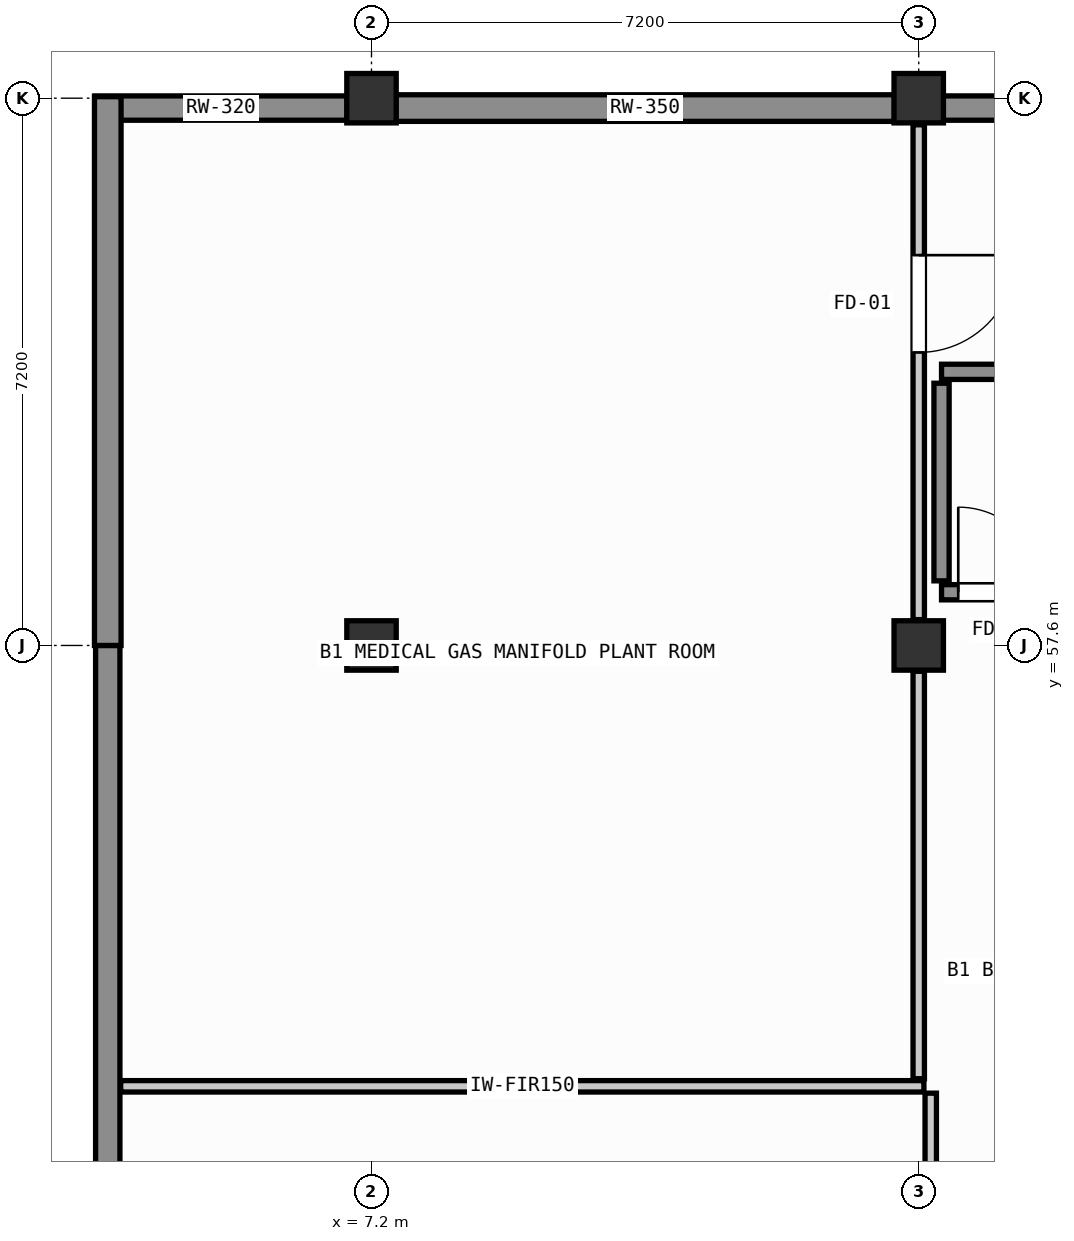
"""IFC4 building model, lengths in metres.
Left out: names, types, materials, properties, quantities, classifications, styles, units other than length and angle.
Written with IfcOpenShell. Run it as: python <this file> out.ifc"""

import sys

from ifc_helpers import new_model, si_unit, direction, frame, frame_2d, origin, origin_2d, place, context, subcontext, project, spatial, rectangle, extrude, element, fill, save


model = new_model("IFC4")
c1 = context("Model", 3, precision=1e-05, world=origin(), true_north=direction((0.0, 1.0)))
c2 = subcontext(c1, "Body", "Model", "MODEL_VIEW")
j1 = project(units=[si_unit("LENGTHUNIT", "METRE"), si_unit("PLANEANGLEUNIT", "RADIAN")], contexts=[c1])
p1 = place(None, origin())
s1 = spatial("IfcSite", under=j1, at=p1, CompositionType="ELEMENT")
p2 = place(p1, origin())
s2 = spatial("IfcBuilding", under=s1, at=p2, CompositionType="ELEMENT")
p3 = place(p2, frame((0.0, 0.0, -4.5)))
s3 = spatial("IfcBuildingStorey", under=s2, at=p3, CompositionType="ELEMENT", Elevation=-4.5)
for number, where, z_axis, x_axis in (
    (1, (7.2, 57.6, -0.5), (0.0, 0.0, 1.0), (1.0, 0.0, 0.0)),
    (2, (7.2, 64.8, -0.5), (0.0, 0.0, 1.0), (1.0, 0.0, 0.0)),
    (3, (14.4, 57.6, -0.5), (0.0, 0.0, 1.0), (1.0, 0.0, 0.0)),
    (4, (14.4, 64.8, -0.5), (0.0, 0.0, 1.0), (1.0, 0.0, 0.0)),
):
    element("IfcColumn", number, at=place(p3, frame(where, z_axis=z_axis, x_axis=x_axis)), inside=s3, PredefinedType="COLUMN", context=c2, shape_type="SweptSolid", body=[
        extrude(rectangle(XDim=0.65, YDim=0.65, at=origin_2d()), origin(), (0.0, 0.0, 1.0), 4.75),
    ])
p4 = place(p3, frame((3.56, 64.67, 0.0), z_axis=(0.0, 0.0, 1.0), x_axis=(1.0, 0.0, 0.0)))
e5 = element("IfcWall", 5, at=p4, inside=s3, PredefinedType="SOLIDWALL", context=c2, shape_type="SweptSolid", body=[
    extrude(rectangle(XDim=3.32, YDim=0.32, at=frame_2d((1.66, 0.0))), origin(), (0.0, 0.0, 1.0), 4.25),
])
p5 = place(p3, frame((7.52, 64.67, 0.0), z_axis=(0.0, 0.0, 1.0), x_axis=(1.0, 0.0, 0.0)))
e6 = element("IfcWall", 6, at=p5, inside=s3, PredefinedType="SOLIDWALL", context=c2, shape_type="SweptSolid", body=[
    extrude(rectangle(XDim=6.56, YDim=0.35, at=frame_2d((3.28, 0.0))), origin(), (0.0, 0.0, 1.0), 4.25),
])
p6 = place(p3, frame((14.72, 64.67, 0.0), z_axis=(0.0, 0.0, 1.0), x_axis=(1.0, 0.0, 0.0)))
e7 = element("IfcWall", 7, at=p6, inside=s3, PredefinedType="SOLIDWALL", context=c2, shape_type="SweptSolid", body=[
    extrude(rectangle(XDim=6.56, YDim=0.32, at=frame_2d((3.28, 0.0))), origin(), (0.0, 0.0, 1.0), 4.25),
])
p7 = place(p3, frame((3.73, 50.4, 0.0), z_axis=(0.0, 0.0, 1.0), x_axis=(0.0, 1.0, 0.0)))
e8 = element("IfcWall", 8, at=p7, inside=s3, PredefinedType="SOLIDWALL", context=c2, shape_type="SweptSolid", body=[
    extrude(rectangle(XDim=7.2, YDim=0.32, at=frame_2d((3.6, 0.0))), origin(), (0.0, 0.0, 1.0), 4.25),
])
p8 = place(p3, frame((3.73, 57.6, 0.0), z_axis=(0.0, 0.0, 1.0), x_axis=(0.0, 1.0, 0.0)))
e9 = element("IfcWall", 9, at=p8, inside=s3, PredefinedType="SOLIDWALL", context=c2, shape_type="SweptSolid", body=[
    extrude(rectangle(XDim=7.22, YDim=0.35, at=frame_2d((3.61, 0.0))), origin(), (0.0, 0.0, 1.0), 4.25),
])
p9 = place(p3, frame((14.7, 58.3, -0.5), z_axis=(0.0, 0.0, 1.0), x_axis=(1.0, 0.0, 0.0)))
e10 = element("IfcWall", 10, at=p9, inside=s3, PredefinedType="SHEAR", context=c2, shape_type="SweptSolid", body=[
    extrude(rectangle(XDim=6.775, YDim=0.2, at=frame_2d((3.388, 0.0))), origin(), (0.0, 0.0, 1.0), 5.0),
])
p10 = place(p9, frame((0.22, 0.0, 0.5)))
e11 = element("IfcOpeningElement", 11, at=p10, cuts=e10, PredefinedType="OPENING", context=c2, shape_type="SweptSolid", body=[
    extrude(rectangle(XDim=1.12, YDim=2.14, at=frame_2d((0.56, 1.07))), frame((0.0, 0.11, 0.0), z_axis=(0.0, -1.0, 0.0), x_axis=(1.0, 0.0, 0.0)), (0.0, 0.0, 1.0), 0.22),
])
p11 = place(p3, frame((14.7, 61.2, -0.5), z_axis=(0.0, 0.0, 1.0), x_axis=(1.0, 0.0, 0.0)))
e12 = element("IfcWall", 12, at=p11, inside=s3, PredefinedType="SHEAR", context=c2, shape_type="SweptSolid", body=[
    extrude(rectangle(XDim=6.775, YDim=0.2, at=frame_2d((3.388, 0.0))), origin(), (0.0, 0.0, 1.0), 5.0),
])
p12 = place(p3, frame((14.7, 58.45, -0.5), z_axis=(0.0, 0.0, 1.0), x_axis=(0.0, 1.0, 0.0)))
e13 = element("IfcWall", 13, at=p12, inside=s3, PredefinedType="SHEAR", context=c2, shape_type="SweptSolid", body=[
    extrude(rectangle(XDim=2.6, YDim=0.2, at=frame_2d((1.3, 0.0))), origin(), (0.0, 0.0, 1.0), 5.0),
])
p13 = place(p3, frame((3.9, 51.8, 0.0), z_axis=(0.0, 0.0, 1.0), x_axis=(1.0, 0.0, 0.0)))
e14 = element("IfcWall", 14, at=p13, inside=s3, PredefinedType="PARTITIONING", context=c2, shape_type="SweptSolid", body=[
    extrude(rectangle(XDim=10.568, YDim=0.15, at=frame_2d((5.284, 0.0))), origin(), (0.0, 0.0, 1.0), 3.55),
])
p14 = place(p3, frame((14.558, 51.71, 0.0), z_axis=(0.0, 0.0, 1.0), x_axis=(0.0, -1.0, 0.0)))
e15 = element("IfcWall", 15, at=p14, inside=s3, PredefinedType="PARTITIONING", context=c2, shape_type="SweptSolid", body=[
    extrude(rectangle(XDim=0.97, YDim=0.15, at=frame_2d((0.485, 0.0))), origin(), (0.0, 0.0, 1.0), 3.4),
])
p15 = place(p3, frame((14.4, 64.45, 0.0), z_axis=(0.0, 0.0, 1.0), x_axis=(0.0, -1.0, 0.0)))
e16 = element("IfcWall", 16, at=p15, inside=s3, PredefinedType="PARTITIONING", context=c2, shape_type="SweptSolid", body=[
    extrude(rectangle(XDim=6.51, YDim=0.15, at=frame_2d((3.255, 0.0))), origin(), (0.0, 0.0, 1.0), 3.4),
])
p16 = place(p15, frame((1.715, 0.0, 0.0)))
e17 = element("IfcOpeningElement", 17, at=p16, cuts=e16, PredefinedType="OPENING", context=c2, shape_type="SweptSolid", body=[
    extrude(rectangle(XDim=1.28, YDim=2.18, at=frame_2d((0.64, 1.09))), frame((0.0, 0.085, 0.0), z_axis=(0.0, -1.0, 0.0), x_axis=(1.0, 0.0, 0.0)), (0.0, 0.0, 1.0), 0.17),
])
p17 = place(p3, frame((14.4, 57.26, 0.0), z_axis=(0.0, 0.0, 1.0), x_axis=(0.0, -1.0, 0.0)))
e18 = element("IfcWall", 18, at=p17, inside=s3, PredefinedType="PARTITIONING", context=c2, shape_type="SweptSolid", body=[
    extrude(rectangle(XDim=5.36, YDim=0.15, at=frame_2d((2.68, 0.0))), origin(), (0.0, 0.0, 1.0), 3.4),
])
p18 = place(p10, origin())
e19 = element("IfcDoor", 19, at=p18, inside=s3, OperationType="SINGLE_SWING_LEFT", PredefinedType="DOOR", context=c2, shape_type="SweptSolid", body=[
    extrude(rectangle(XDim=1.12, YDim=2.14, at=frame_2d((0.56, 1.07))), frame((0.0, 0.025, 0.0), z_axis=(0.0, -1.0, 0.0), x_axis=(1.0, 0.0, 0.0)), (0.0, 0.0, 1.0), 0.05),
])
fill(e11, e19)
p19 = place(p16, origin())
e20 = element("IfcDoor", 20, at=p19, inside=s3, OperationType="SINGLE_SWING_RIGHT", PredefinedType="DOOR", context=c2, shape_type="SweptSolid", body=[
    extrude(rectangle(XDim=1.28, YDim=2.18, at=frame_2d((0.64, 1.09))), frame((0.0, 0.025, 0.0), z_axis=(0.0, -1.0, 0.0), x_axis=(1.0, 0.0, 0.0)), (0.0, 0.0, 1.0), 0.05),
])
fill(e17, e20)
save(model, sys.argv[1])
